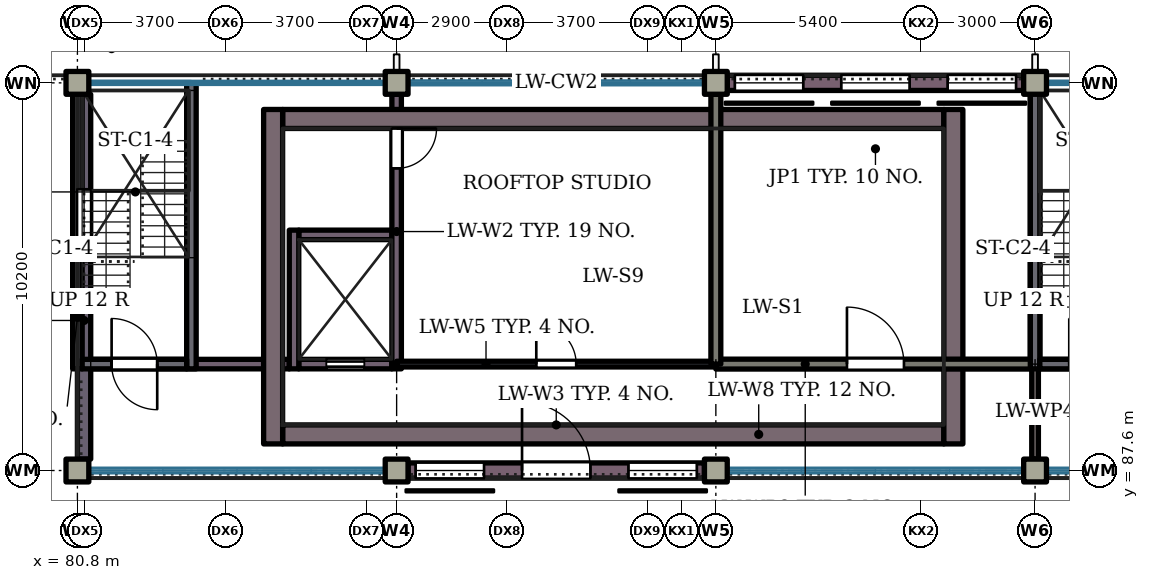
"""IFC4 building model, lengths in metres.
Left out: names, types, materials, properties, quantities, classifications, styles, units other than length and angle.
Written with IfcOpenShell. Run it as: python <this file> out.ifc"""

import sys

from ifc_helpers import new_model, si_unit, direction, frame, frame_2d, origin, origin_2d, place, context, subcontext, project, spatial, rectangle, extrude, element, fill, save


model = new_model("IFC4")
c1 = context("Model", 3, precision=1e-05, world=origin(), true_north=direction((0.0, 1.0)))
c2 = subcontext(c1, "Body", "Model", "MODEL_VIEW")
j1 = project(units=[si_unit("LENGTHUNIT", "METRE"), si_unit("PLANEANGLEUNIT", "RADIAN")], contexts=[c1])
p1 = place(None, origin())
s1 = spatial("IfcSite", under=j1, at=p1, CompositionType="ELEMENT")
p2 = place(p1, origin())
s2 = spatial("IfcBuilding", under=s1, at=p2, CompositionType="ELEMENT")
p3 = place(p2, frame((0.0, 0.0, 16.8)))
s3 = spatial("IfcBuildingStorey", under=s2, at=p3, CompositionType="ELEMENT", Elevation=16.8)
for number, where, z_axis, x_axis in (
    (1, (80.8, 87.6, 0.0), (0.0, 0.0, 1.0), (1.0, 0.0, 0.0)),
    (2, (89.2, 87.6, 0.0), (0.0, 0.0, 1.0), (1.0, 0.0, 0.0)),
    (3, (97.6, 87.6, 0.0), (0.0, 0.0, 1.0), (1.0, 0.0, 0.0)),
    (4, (106.0, 87.6, 0.0), (0.0, 0.0, 1.0), (1.0, 0.0, 0.0)),
    (5, (80.8, 97.8, 0.0), (0.0, 0.0, 1.0), (1.0, 0.0, 0.0)),
    (6, (89.2, 97.8, 0.0), (0.0, 0.0, 1.0), (1.0, 0.0, 0.0)),
    (7, (97.6, 97.8, 0.0), (0.0, 0.0, 1.0), (1.0, 0.0, 0.0)),
    (8, (106.0, 97.8, 0.0), (0.0, 0.0, 1.0), (1.0, 0.0, 0.0)),
):
    element("IfcColumn", number, at=place(p3, frame(where, z_axis=z_axis, x_axis=x_axis)), inside=s3, PredefinedType="COLUMN", context=c2, shape_type="SweptSolid", body=[
        extrude(rectangle(XDim=0.6, YDim=0.6, at=origin_2d()), origin(), (0.0, 0.0, 1.0), 4.2),
    ])
p4 = place(p3, frame((81.15, 90.4, 0.0), z_axis=(0.0, 0.0, 1.0), x_axis=(1.0, 0.0, 0.0)))
e9 = element("IfcWall", 9, at=p4, inside=s3, PredefinedType="SHEAR", context=c2, shape_type="SweptSolid", body=[
    extrude(rectangle(XDim=5.225, YDim=0.25, at=frame_2d((2.613, 0.0))), origin(), (0.0, 0.0, 1.0), 4.2),
])
p5 = place(p4, frame((0.55, 0.0, 0.0)))
e10 = element("IfcOpeningElement", 10, at=p5, cuts=e9, PredefinedType="OPENING", context=c2, shape_type="SweptSolid", body=[
    extrude(rectangle(XDim=1.2, YDim=2.1, at=frame_2d((0.6, 1.05))), frame((0.0, 0.135, 0.0), z_axis=(0.0, -1.0, 0.0), x_axis=(1.0, 0.0, 0.0)), (0.0, 0.0, 1.0), 0.27),
])
p6 = place(p3, frame((86.625, 90.4, 0.0), z_axis=(0.0, 0.0, 1.0), x_axis=(1.0, 0.0, 0.0)))
e11 = element("IfcWall", 11, at=p6, inside=s3, PredefinedType="SHEAR", context=c2, shape_type="SweptSolid", body=[
    extrude(rectangle(XDim=2.45, YDim=0.25, at=frame_2d((1.225, 0.0))), origin(), (0.0, 0.0, 1.0), 4.2),
])
p7 = place(p6, frame((0.725, 0.0, 0.0)))
e12 = element("IfcOpeningElement", 12, at=p7, cuts=e11, PredefinedType="OPENING", context=c2, shape_type="SweptSolid", body=[
    extrude(rectangle(XDim=1.0, YDim=2.1, at=frame_2d((0.5, 1.05))), frame((0.0, 0.135, 0.0), z_axis=(0.0, -1.0, 0.0), x_axis=(1.0, 0.0, 0.0)), (0.0, 0.0, 1.0), 0.27),
])
p8 = place(p3, frame((106.125, 90.4, 0.0), z_axis=(0.0, 0.0, 1.0), x_axis=(1.0, 0.0, 0.0)))
e13 = element("IfcWall", 13, at=p8, inside=s3, PredefinedType="SHEAR", context=c2, shape_type="SweptSolid", body=[
    extrude(rectangle(XDim=2.75, YDim=0.25, at=frame_2d((1.375, 0.0))), origin(), (0.0, 0.0, 1.0), 4.2),
])
p9 = place(p8, frame((0.775, 0.0, 0.0)))
e14 = element("IfcOpeningElement", 14, at=p9, cuts=e13, PredefinedType="OPENING", context=c2, shape_type="SweptSolid", body=[
    extrude(rectangle(XDim=1.2, YDim=2.1, at=frame_2d((0.6, 1.05))), frame((0.0, 0.135, 0.0), z_axis=(0.0, -1.0, 0.0), x_axis=(1.0, 0.0, 0.0)), (0.0, 0.0, 1.0), 0.27),
])
p10 = place(p3, frame((86.625, 93.8, 0.0), z_axis=(0.0, 0.0, 1.0), x_axis=(1.0, 0.0, 0.0)))
e15 = element("IfcWall", 15, at=p10, inside=s3, PredefinedType="SHEAR", context=c2, shape_type="SweptSolid", body=[
    extrude(rectangle(XDim=2.45, YDim=0.25, at=frame_2d((1.225, 0.0))), origin(), (0.0, 0.0, 1.0), 4.2),
])
p11 = place(p3, frame((80.975, 87.9, 0.0), z_axis=(0.0, 0.0, 1.0), x_axis=(0.0, 1.0, 0.0)))
e16 = element("IfcWall", 16, at=p11, inside=s3, PredefinedType="SHEAR", context=c2, shape_type="SweptSolid", body=[
    extrude(rectangle(XDim=9.6, YDim=0.35, at=frame_2d((4.8, 0.0))), origin(), (0.0, 0.0, 1.0), 4.2),
])
p12 = place(p11, frame((5.3, 0.0, 0.9)))
e17 = element("IfcOpeningElement", 17, at=p12, cuts=e16, PredefinedType="OPENING", context=c2, shape_type="SweptSolid", body=[
    extrude(rectangle(XDim=1.8, YDim=2.1, at=frame_2d((0.9, 1.05))), frame((0.0, 0.185, 0.0), z_axis=(0.0, -1.0, 0.0), x_axis=(1.0, 0.0, 0.0)), (0.0, 0.0, 1.0), 0.37),
])
p13 = place(p3, frame((86.5, 90.275, 0.0), z_axis=(0.0, 0.0, 1.0), x_axis=(0.0, 1.0, 0.0)))
e18 = element("IfcWall", 18, at=p13, inside=s3, PredefinedType="SHEAR", context=c2, shape_type="SweptSolid", body=[
    extrude(rectangle(XDim=3.65, YDim=0.25, at=frame_2d((1.825, 0.0))), origin(), (0.0, 0.0, 1.0), 4.2),
])
p14 = place(p3, frame((89.2, 90.275, 0.0), z_axis=(0.0, 0.0, 1.0), x_axis=(0.0, 1.0, 0.0)))
e19 = element("IfcWall", 19, at=p14, inside=s3, PredefinedType="SHEAR", context=c2, shape_type="SweptSolid", body=[
    extrude(rectangle(XDim=7.225, YDim=0.25, at=frame_2d((3.613, 0.0))), origin(), (0.0, 0.0, 1.0), 4.2),
])
p15 = place(p14, frame((5.275, 0.0, 0.0)))
e20 = element("IfcOpeningElement", 20, at=p15, cuts=e19, PredefinedType="OPENING", context=c2, shape_type="SweptSolid", body=[
    extrude(rectangle(XDim=1.05, YDim=2.1, at=frame_2d((0.525, 1.05))), frame((0.0, 0.135, 0.0), z_axis=(0.0, -1.0, 0.0), x_axis=(1.0, 0.0, 0.0)), (0.0, 0.0, 1.0), 0.27),
])
p16 = place(p3, frame((106.0, 90.275, 0.0), z_axis=(0.0, 0.0, 1.0), x_axis=(0.0, 1.0, 0.0)))
e21 = element("IfcWall", 21, at=p16, inside=s3, PredefinedType="SHEAR", context=c2, shape_type="SweptSolid", body=[
    extrude(rectangle(XDim=7.225, YDim=0.25, at=frame_2d((3.613, 0.0))), origin(), (0.0, 0.0, 1.0), 4.2),
])
p17 = place(p3, frame((89.5, 87.6, 0.0), z_axis=(0.0, 0.0, 1.0), x_axis=(1.0, 0.0, 0.0)))
e22 = element("IfcWall", 22, at=p17, inside=s3, PredefinedType="SOLIDWALL", context=c2, shape_type="SweptSolid", body=[
    extrude(rectangle(XDim=7.8, YDim=0.4, at=frame_2d((3.9, 0.0))), origin(), (0.0, 0.0, 1.0), 3.3),
])
p18 = place(p17, frame((3.0, 0.0, 0.0)))
e23 = element("IfcOpeningElement", 23, at=p18, cuts=e22, PredefinedType="OPENING", context=c2, shape_type="SweptSolid", body=[
    extrude(rectangle(XDim=1.8, YDim=2.4, at=frame_2d((0.9, 1.2))), frame((0.0, 0.21, 0.0), z_axis=(0.0, -1.0, 0.0), x_axis=(1.0, 0.0, 0.0)), (0.0, 0.0, 1.0), 0.42),
])
p19 = place(p17, frame((0.2, 0.0, 0.9)))
e24 = element("IfcOpeningElement", 24, at=p19, cuts=e22, PredefinedType="OPENING", context=c2, shape_type="SweptSolid", body=[
    extrude(rectangle(XDim=1.8, YDim=1.9, at=frame_2d((0.9, 0.95))), frame((0.0, 0.21, 0.0), z_axis=(0.0, -1.0, 0.0), x_axis=(1.0, 0.0, 0.0)), (0.0, 0.0, 1.0), 0.42),
])
p20 = place(p17, frame((5.8, 0.0, 0.9)))
e25 = element("IfcOpeningElement", 25, at=p20, cuts=e22, PredefinedType="OPENING", context=c2, shape_type="SweptSolid", body=[
    extrude(rectangle(XDim=1.8, YDim=1.9, at=frame_2d((0.9, 0.95))), frame((0.0, 0.21, 0.0), z_axis=(0.0, -1.0, 0.0), x_axis=(1.0, 0.0, 0.0)), (0.0, 0.0, 1.0), 0.42),
])
p21 = place(p3, frame((97.9, 97.8, 0.0), z_axis=(0.0, 0.0, 1.0), x_axis=(1.0, 0.0, 0.0)))
e26 = element("IfcWall", 26, at=p21, inside=s3, PredefinedType="SOLIDWALL", context=c2, shape_type="SweptSolid", body=[
    extrude(rectangle(XDim=7.8, YDim=0.4, at=frame_2d((3.9, 0.0))), origin(), (0.0, 0.0, 1.0), 3.3),
])
p22 = place(p21, frame((0.2, 0.0, 0.9)))
e27 = element("IfcOpeningElement", 27, at=p22, cuts=e26, PredefinedType="OPENING", context=c2, shape_type="SweptSolid", body=[
    extrude(rectangle(XDim=1.8, YDim=2.1, at=frame_2d((0.9, 1.05))), frame((0.0, 0.21, 0.0), z_axis=(0.0, -1.0, 0.0), x_axis=(1.0, 0.0, 0.0)), (0.0, 0.0, 1.0), 0.42),
])
p23 = place(p21, frame((3.0, 0.0, 0.9)))
e28 = element("IfcOpeningElement", 28, at=p23, cuts=e26, PredefinedType="OPENING", context=c2, shape_type="SweptSolid", body=[
    extrude(rectangle(XDim=1.8, YDim=2.1, at=frame_2d((0.9, 1.05))), frame((0.0, 0.21, 0.0), z_axis=(0.0, -1.0, 0.0), x_axis=(1.0, 0.0, 0.0)), (0.0, 0.0, 1.0), 0.42),
])
p24 = place(p21, frame((5.8, 0.0, 0.9)))
e29 = element("IfcOpeningElement", 29, at=p24, cuts=e26, PredefinedType="OPENING", context=c2, shape_type="SweptSolid", body=[
    extrude(rectangle(XDim=1.8, YDim=2.1, at=frame_2d((0.9, 1.05))), frame((0.0, 0.21, 0.0), z_axis=(0.0, -1.0, 0.0), x_axis=(1.0, 0.0, 0.0)), (0.0, 0.0, 1.0), 0.42),
])
for number, where, z_axis, x_axis in (
    (30, (86.2, 88.55, 4.2), (0.0, 0.0, 1.0), (1.0, 0.0, 0.0)),
    (31, (86.2, 96.85, 4.2), (0.0, 0.0, 1.0), (1.0, 0.0, 0.0)),
):
    element("IfcWall", number, at=place(p3, frame(where, z_axis=z_axis, x_axis=x_axis)), inside=s3, PredefinedType="SOLIDWALL", context=c2, shape_type="SweptSolid", body=[
        extrude(rectangle(XDim=17.4, YDim=0.5, at=frame_2d((8.7, 0.0))), origin(), (0.0, 0.0, 1.0), 0.9),
    ])
for number, where, z_axis, x_axis in (
    (32, (85.95, 88.3, 4.2), (0.0, 0.0, 1.0), (0.0, 1.0, 0.0)),
    (33, (103.85, 88.3, 4.2), (0.0, 0.0, 1.0), (0.0, 1.0, 0.0)),
):
    element("IfcWall", number, at=place(p3, frame(where, z_axis=z_axis, x_axis=x_axis)), inside=s3, PredefinedType="SOLIDWALL", context=c2, shape_type="SweptSolid", body=[
        extrude(rectangle(XDim=8.8, YDim=0.5, at=frame_2d((4.4, 0.0))), origin(), (0.0, 0.0, 1.0), 0.9),
    ])
p25 = place(p3, frame((97.6, 90.4, 0.0), z_axis=(0.0, 0.0, 1.0), x_axis=(1.0, 0.0, 0.0)))
e34 = element("IfcWall", 34, at=p25, inside=s3, PredefinedType="PARTITIONING", context=c2, shape_type="SweptSolid", body=[
    extrude(rectangle(XDim=8.4, YDim=0.26, at=frame_2d((4.2, 0.0))), origin(), (0.0, 0.0, 1.0), 3.9),
])
p26 = place(p25, frame((3.45, 0.0, 0.0)))
e35 = element("IfcOpeningElement", 35, at=p26, cuts=e34, PredefinedType="OPENING", context=c2, shape_type="SweptSolid", body=[
    extrude(rectangle(XDim=1.5, YDim=2.1, at=frame_2d((0.75, 1.05))), frame((0.0, 0.14, 0.0), z_axis=(0.0, -1.0, 0.0), x_axis=(1.0, 0.0, 0.0)), (0.0, 0.0, 1.0), 0.28),
])
p27 = place(p3, frame((89.2, 90.4, 0.0), z_axis=(0.0, 0.0, 1.0), x_axis=(1.0, 0.0, 0.0)))
e36 = element("IfcWall", 36, at=p27, inside=s3, PredefinedType="PARTITIONING", context=c2, shape_type="SweptSolid", body=[
    extrude(rectangle(XDim=8.4, YDim=0.15, at=frame_2d((4.2, 0.0))), origin(), (0.0, 0.0, 1.0), 3.9),
])
p28 = place(p27, frame((3.675, 0.0, 0.0)))
e37 = element("IfcOpeningElement", 37, at=p28, cuts=e36, PredefinedType="OPENING", context=c2, shape_type="SweptSolid", body=[
    extrude(rectangle(XDim=1.05, YDim=2.1, at=frame_2d((0.525, 1.05))), frame((0.0, 0.085, 0.0), z_axis=(0.0, -1.0, 0.0), x_axis=(1.0, 0.0, 0.0)), (0.0, 0.0, 1.0), 0.17),
])
p29 = place(p3, frame((97.6, 90.4, 0.0), z_axis=(0.0, 0.0, 1.0), x_axis=(0.0, 1.0, 0.0)))
e38 = element("IfcWall", 38, at=p29, inside=s3, PredefinedType="PARTITIONING", context=c2, shape_type="SweptSolid", body=[
    extrude(rectangle(XDim=7.1, YDim=0.26, at=frame_2d((3.55, 0.0))), origin(), (0.0, 0.0, 1.0), 3.0),
])
p30 = place(p3, frame((106.0, 87.9, 0.0), z_axis=(0.0, 0.0, 1.0), x_axis=(0.0, 1.0, 0.0)))
e39 = element("IfcWall", 39, at=p30, inside=s3, PredefinedType="PARTITIONING", context=c2, shape_type="SweptSolid", body=[
    extrude(rectangle(XDim=2.5, YDim=0.175, at=frame_2d((1.25, 0.0))), origin(), (0.0, 0.0, 1.0), 3.0),
])
p31 = place(p3, frame((83.8, 93.2, 0.0), z_axis=(0.0, 0.0, 1.0), x_axis=(0.0, 1.0, 0.0)))
e40 = element("IfcWall", 40, at=p31, inside=s3, PredefinedType="PARTITIONING", context=c2, shape_type="SweptSolid", body=[
    extrude(rectangle(XDim=4.4, YDim=0.15, at=frame_2d((2.2, 0.0))), origin(), (0.0, 0.0, 1.0), 3.9),
])
for number, where, z_axis, x_axis in (
    (41, (80.8, 90.275, 4.2), (0.0, 0.0, 1.0), (0.0, 1.0, 0.0)),
    (42, (83.8, 90.275, 4.2), (0.0, 0.0, 1.0), (0.0, 1.0, 0.0)),
):
    element("IfcWall", number, at=place(p3, frame(where, z_axis=z_axis, x_axis=x_axis)), inside=s3, PredefinedType="SHEAR", context=c2, shape_type="SweptSolid", body=[
        extrude(rectangle(XDim=7.525, YDim=0.25, at=frame_2d((3.763, 0.0))), origin(), (0.0, 0.0, 1.0), 2.8),
    ])
p32 = place(p3, frame((80.925, 90.4, 4.2), z_axis=(0.0, 0.0, 1.0), x_axis=(1.0, 0.0, 0.0)))
e43 = element("IfcWall", 43, at=p32, inside=s3, PredefinedType="SHEAR", context=c2, shape_type="SweptSolid", body=[
    extrude(rectangle(XDim=2.75, YDim=0.25, at=frame_2d((1.375, 0.0))), origin(), (0.0, 0.0, 1.0), 2.8),
])
p33 = place(p32, frame((0.775, 0.0, 0.0)))
e44 = element("IfcOpeningElement", 44, at=p33, cuts=e43, PredefinedType="OPENING", context=c2, shape_type="SweptSolid", body=[
    extrude(rectangle(XDim=1.2, YDim=2.1, at=frame_2d((0.6, 1.05))), frame((0.0, 0.135, 0.0), z_axis=(0.0, -1.0, 0.0), x_axis=(1.0, 0.0, 0.0)), (0.0, 0.0, 1.0), 0.27),
])
p34 = place(p3, frame((106.0, 90.275, 4.2), z_axis=(0.0, 0.0, 1.0), x_axis=(0.0, 1.0, 0.0)))
e45 = element("IfcWall", 45, at=p34, inside=s3, PredefinedType="SHEAR", context=c2, shape_type="SweptSolid", body=[
    extrude(rectangle(XDim=7.525, YDim=0.25, at=frame_2d((3.763, 0.0))), origin(), (0.0, 0.0, 1.0), 3.5),
])
p35 = place(p3, frame((106.125, 90.4, 4.2), z_axis=(0.0, 0.0, 1.0), x_axis=(1.0, 0.0, 0.0)))
e46 = element("IfcWall", 46, at=p35, inside=s3, PredefinedType="SHEAR", context=c2, shape_type="SweptSolid", body=[
    extrude(rectangle(XDim=2.75, YDim=0.25, at=frame_2d((1.375, 0.0))), origin(), (0.0, 0.0, 1.0), 3.5),
])
p36 = place(p35, frame((0.775, 0.0, 0.0)))
e47 = element("IfcOpeningElement", 47, at=p36, cuts=e46, PredefinedType="OPENING", context=c2, shape_type="SweptSolid", body=[
    extrude(rectangle(XDim=1.2, YDim=2.1, at=frame_2d((0.6, 1.05))), frame((0.0, 0.135, 0.0), z_axis=(0.0, -1.0, 0.0), x_axis=(1.0, 0.0, 0.0)), (0.0, 0.0, 1.0), 0.27),
])
p37 = place(p18, origin())
e48 = element("IfcDoor", 48, at=p37, inside=s3, OperationType="DOUBLE_DOOR_SINGLE_SWING", PredefinedType="DOOR", context=c2, shape_type="SweptSolid", body=[
    extrude(rectangle(XDim=1.8, YDim=2.4, at=frame_2d((0.9, 1.2))), frame((0.0, 0.025, 0.0), z_axis=(0.0, -1.0, 0.0), x_axis=(1.0, 0.0, 0.0)), (0.0, 0.0, 1.0), 0.05),
])
fill(e23, e48)
p38 = place(p19, origin())
e49 = element("IfcWindow", 49, at=p38, inside=s3, PartitioningType="SINGLE_PANEL", PredefinedType="WINDOW", context=c2, shape_type="SweptSolid", body=[
    extrude(rectangle(XDim=1.8, YDim=1.9, at=frame_2d((0.9, 0.95))), frame((0.0, 0.03, 0.0), z_axis=(0.0, -1.0, 0.0), x_axis=(1.0, 0.0, 0.0)), (0.0, 0.0, 1.0), 0.06),
])
fill(e24, e49)
p39 = place(p20, origin())
e50 = element("IfcWindow", 50, at=p39, inside=s3, PartitioningType="SINGLE_PANEL", PredefinedType="WINDOW", context=c2, shape_type="SweptSolid", body=[
    extrude(rectangle(XDim=1.8, YDim=1.9, at=frame_2d((0.9, 0.95))), frame((0.0, 0.03, 0.0), z_axis=(0.0, -1.0, 0.0), x_axis=(1.0, 0.0, 0.0)), (0.0, 0.0, 1.0), 0.06),
])
fill(e25, e50)
p40 = place(p22, origin())
e51 = element("IfcWindow", 51, at=p40, inside=s3, PartitioningType="SINGLE_PANEL", PredefinedType="WINDOW", context=c2, shape_type="SweptSolid", body=[
    extrude(rectangle(XDim=1.8, YDim=2.1, at=frame_2d((0.9, 1.05))), frame((0.0, 0.03, 0.0), z_axis=(0.0, -1.0, 0.0), x_axis=(1.0, 0.0, 0.0)), (0.0, 0.0, 1.0), 0.06),
])
fill(e27, e51)
p41 = place(p23, origin())
e52 = element("IfcWindow", 52, at=p41, inside=s3, PartitioningType="SINGLE_PANEL", PredefinedType="WINDOW", context=c2, shape_type="SweptSolid", body=[
    extrude(rectangle(XDim=1.8, YDim=2.1, at=frame_2d((0.9, 1.05))), frame((0.0, 0.03, 0.0), z_axis=(0.0, -1.0, 0.0), x_axis=(1.0, 0.0, 0.0)), (0.0, 0.0, 1.0), 0.06),
])
fill(e28, e52)
p42 = place(p24, origin())
e53 = element("IfcWindow", 53, at=p42, inside=s3, PartitioningType="SINGLE_PANEL", PredefinedType="WINDOW", context=c2, shape_type="SweptSolid", body=[
    extrude(rectangle(XDim=1.8, YDim=2.1, at=frame_2d((0.9, 1.05))), frame((0.0, 0.03, 0.0), z_axis=(0.0, -1.0, 0.0), x_axis=(1.0, 0.0, 0.0)), (0.0, 0.0, 1.0), 0.06),
])
fill(e29, e53)
p43 = place(p12, origin())
e54 = element("IfcWindow", 54, at=p43, inside=s3, PartitioningType="SINGLE_PANEL", PredefinedType="WINDOW", context=c2, shape_type="SweptSolid", body=[
    extrude(rectangle(XDim=1.8, YDim=2.1, at=frame_2d((0.9, 1.05))), frame((0.0, 0.03, 0.0), z_axis=(0.0, -1.0, 0.0), x_axis=(1.0, 0.0, 0.0)), (0.0, 0.0, 1.0), 0.06),
])
fill(e17, e54)
p44 = place(p28, origin())
e55 = element("IfcDoor", 55, at=p44, inside=s3, OperationType="SINGLE_SWING_LEFT", PredefinedType="DOOR", context=c2, shape_type="SweptSolid", body=[
    extrude(rectangle(XDim=1.05, YDim=2.1, at=frame_2d((0.525, 1.05))), frame((0.0, 0.025, 0.0), z_axis=(0.0, -1.0, 0.0), x_axis=(1.0, 0.0, 0.0)), (0.0, 0.0, 1.0), 0.05),
])
fill(e37, e55)
p45 = place(p15, origin())
e56 = element("IfcDoor", 56, at=p45, inside=s3, OperationType="SINGLE_SWING_RIGHT", PredefinedType="DOOR", context=c2, shape_type="SweptSolid", body=[
    extrude(rectangle(XDim=1.05, YDim=2.1, at=frame_2d((0.525, 1.05))), frame((0.0, 0.025, 0.0), z_axis=(0.0, -1.0, 0.0), x_axis=(1.0, 0.0, 0.0)), (0.0, 0.0, 1.0), 0.05),
])
fill(e20, e56)
p46 = place(p26, origin())
e57 = element("IfcDoor", 57, at=p46, inside=s3, OperationType="DOUBLE_DOOR_SINGLE_SWING", PredefinedType="DOOR", context=c2, shape_type="SweptSolid", body=[
    extrude(rectangle(XDim=1.5, YDim=2.1, at=frame_2d((0.75, 1.05))), frame((0.0, 0.025, 0.0), z_axis=(0.0, -1.0, 0.0), x_axis=(1.0, 0.0, 0.0)), (0.0, 0.0, 1.0), 0.05),
])
fill(e35, e57)
p47 = place(p5, origin())
e58 = element("IfcDoor", 58, at=p47, inside=s3, OperationType="SINGLE_SWING_LEFT", PredefinedType="DOOR", context=c2, shape_type="SweptSolid", body=[
    extrude(rectangle(XDim=1.2, YDim=2.1, at=frame_2d((0.6, 1.05))), frame((0.0, 0.025, 0.0), z_axis=(0.0, -1.0, 0.0), x_axis=(1.0, 0.0, 0.0)), (0.0, 0.0, 1.0), 0.05),
])
fill(e10, e58)
p48 = place(p7, origin())
e59 = element("IfcDoor", 59, at=p48, inside=s3, OperationType="SLIDING_TO_LEFT", PredefinedType="DOOR", context=c2, shape_type="SweptSolid", body=[
    extrude(rectangle(XDim=1.0, YDim=2.1, at=frame_2d((0.5, 1.05))), frame((0.0, 0.025, 0.0), z_axis=(0.0, -1.0, 0.0), x_axis=(1.0, 0.0, 0.0)), (0.0, 0.0, 1.0), 0.05),
])
fill(e12, e59)
p49 = place(p9, origin())
e60 = element("IfcDoor", 60, at=p49, inside=s3, OperationType="SINGLE_SWING_LEFT", PredefinedType="DOOR", context=c2, shape_type="SweptSolid", body=[
    extrude(rectangle(XDim=1.2, YDim=2.1, at=frame_2d((0.6, 1.05))), frame((0.0, 0.025, 0.0), z_axis=(0.0, -1.0, 0.0), x_axis=(1.0, 0.0, 0.0)), (0.0, 0.0, 1.0), 0.05),
])
fill(e14, e60)
p50 = place(p33, origin())
e61 = element("IfcDoor", 61, at=p50, inside=s3, OperationType="SINGLE_SWING_RIGHT", PredefinedType="DOOR", context=c2, shape_type="SweptSolid", body=[
    extrude(rectangle(XDim=1.2, YDim=2.1, at=frame_2d((0.6, 1.05))), frame((0.0, 0.025, 0.0), z_axis=(0.0, -1.0, 0.0), x_axis=(1.0, 0.0, 0.0)), (0.0, 0.0, 1.0), 0.05),
])
fill(e44, e61)
p51 = place(p36, origin())
e62 = element("IfcDoor", 62, at=p51, inside=s3, OperationType="SINGLE_SWING_RIGHT", PredefinedType="DOOR", context=c2, shape_type="SweptSolid", body=[
    extrude(rectangle(XDim=1.2, YDim=2.1, at=frame_2d((0.6, 1.05))), frame((0.0, 0.025, 0.0), z_axis=(0.0, -1.0, 0.0), x_axis=(1.0, 0.0, 0.0)), (0.0, 0.0, 1.0), 0.05),
])
fill(e47, e62)
save(model, sys.argv[1])
